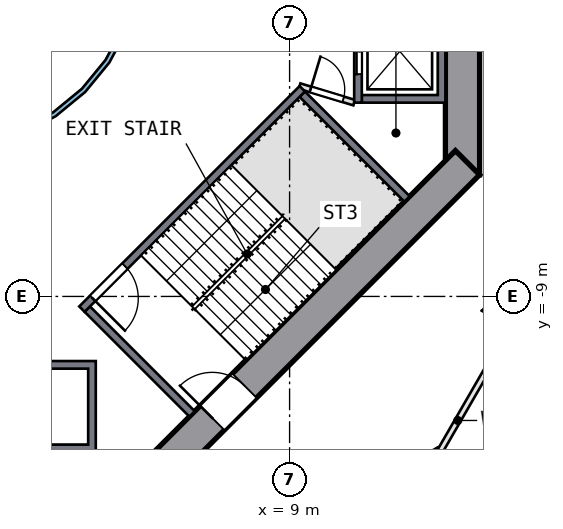
"""IFC4 building model, lengths in metres.
Left out: names, types, materials, properties, quantities, classifications, styles, units other than length and angle.
Written with IfcOpenShell. Run it as: python <this file> out.ifc"""

import sys

from ifc_helpers import new_model, si_unit, direction, frame, frame_2d, origin, place, context, subcontext, project, spatial, polyline, rectangle, outline, extrude, element, fill, save


model = new_model("IFC4")
c1 = context("Model", 3, precision=1e-05, world=origin(), true_north=direction((0.0, 1.0)))
c2 = subcontext(c1, "Body", "Model", "MODEL_VIEW")
j1 = project(units=[si_unit("LENGTHUNIT", "METRE"), si_unit("PLANEANGLEUNIT", "RADIAN")], contexts=[c1])
p1 = place(None, origin())
s1 = spatial("IfcSite", under=j1, at=p1, CompositionType="ELEMENT")
p2 = place(p1, origin())
s2 = spatial("IfcBuilding", under=s1, at=p2, CompositionType="ELEMENT")
p3 = place(p2, frame((0.0, 0.0, 23.5)))
s3 = spatial("IfcBuildingStorey", under=s2, at=p3, CompositionType="ELEMENT", Elevation=23.5)
p4 = place(p3, frame((13.55, -5.799, 0.0), z_axis=(0.0, 0.0, 1.0), x_axis=(0.0, 1.0, 0.0)))
e1 = element("IfcWall", 1, at=p4, inside=s3, PredefinedType="SHEAR", context=c2, shape_type="SweptSolid", body=[
    extrude(rectangle(XDim=11.598, YDim=0.9, at=frame_2d((5.799, 0.0))), origin(), (0.0, 0.0, 1.0), 4.5),
])
p5 = place(p4, frame((4.899, 0.0, 0.0)))
e2 = element("IfcOpeningElement", 2, at=p5, cuts=e1, PredefinedType="OPENING", context=c2, shape_type="SweptSolid", body=[
    extrude(rectangle(XDim=1.8, YDim=2.1, at=frame_2d((0.9, 1.05))), frame((0.0, 0.46, 0.0), z_axis=(0.0, -1.0, 0.0), x_axis=(1.0, 0.0, 0.0)), (0.0, 0.0, 1.0), 0.92),
])
p6 = place(p3, frame((5.481, -13.682, 0.0), z_axis=(0.0, 0.0, 1.0), x_axis=(0.707106781, 0.707106781, 0.0)))
e3 = element("IfcWall", 3, at=p6, inside=s3, PredefinedType="SHEAR", context=c2, shape_type="SweptSolid", body=[
    extrude(rectangle(XDim=11.598, YDim=0.9, at=frame_2d((5.799, 0.0))), origin(), (0.0, 0.0, 1.0), 4.5),
])
p7 = place(p6, frame((2.099, 0.0, 0.0)))
e4 = element("IfcOpeningElement", 4, at=p7, cuts=e3, PredefinedType="OPENING", context=c2, shape_type="SweptSolid", body=[
    extrude(rectangle(XDim=1.2, YDim=2.1, at=frame_2d((0.6, 1.05))), frame((0.0, 0.46, 0.0), z_axis=(0.0, -1.0, 0.0), x_axis=(1.0, 0.0, 0.0)), (0.0, 0.0, 1.0), 0.92),
])
p8 = place(p3, origin())
e5 = element("IfcWall", 5, at=p8, inside=s3, PredefinedType="SOLIDWALL", context=c2, shape_type="SweptSolid", body=[
    extrude(outline(polyline([(13.1, -3.9), (10.9, -3.9), (10.9, -3.7), (12.9, -3.7), (12.9, -1.4), (10.9, -1.4), (10.9, -1.2), (13.1, -1.2), (13.1, -3.9)])), origin(), (0.0, 0.0, 1.0), 4.0),
])
p9 = place(p3, frame((10.8, -1.2, 0.0), z_axis=(0.0, 0.0, 1.0), x_axis=(0.0, -1.0, 0.0)))
e6 = element("IfcWall", 6, at=p9, inside=s3, PredefinedType="SOLIDWALL", context=c2, shape_type="SweptSolid", body=[
    extrude(rectangle(XDim=2.7, YDim=0.2, at=frame_2d((1.35, 0.0))), origin(), (0.0, 0.0, 1.0), 4.0),
])
p10 = place(p9, frame((0.75, 0.0, 0.0)))
e7 = element("IfcOpeningElement", 7, at=p10, cuts=e6, PredefinedType="OPENING", context=c2, shape_type="SweptSolid", body=[
    extrude(rectangle(XDim=1.2, YDim=2.1, at=frame_2d((0.6, 1.05))), frame((0.0, 0.11, 0.0), z_axis=(0.0, -1.0, 0.0), x_axis=(1.0, 0.0, 0.0)), (0.0, 0.0, 1.0), 0.22),
])
p11 = place(p3, origin())
e8 = element("IfcWall", 8, at=p11, inside=s3, PredefinedType="SOLIDWALL", context=c2, shape_type="SweptSolid", body=[
    extrude(outline(polyline([(3.9, -10.7), (3.9, -13.1), (1.2, -13.1), (1.2, -10.7), (3.9, -10.7)]), holes=[polyline([(1.4, -12.9), (3.7, -12.9), (3.7, -10.9), (1.4, -10.9), (1.4, -12.9)])]), origin(), (0.0, 0.0, 1.0), 4.0),
])
p12 = place(p3, frame((9.334, -3.535, 0.0), z_axis=(0.0, 0.0, 1.0), x_axis=(-0.707106781, -0.707106781, 0.0)))
e9 = element("IfcWall", 9, at=p12, inside=s3, PredefinedType="SOLIDWALL", context=c2, shape_type="SweptSolid", body=[
    extrude(rectangle(XDim=8.2, YDim=0.2, at=frame_2d((4.1, 0.0))), origin(), (0.0, 0.0, 1.0), 4.0),
])
p13 = place(p12, frame((6.6, 0.0, 0.0)))
e10 = element("IfcOpeningElement", 10, at=p13, cuts=e9, PredefinedType="OPENING", context=c2, shape_type="SweptSolid", body=[
    extrude(rectangle(XDim=1.2, YDim=2.1, at=frame_2d((0.6, 1.05))), frame((0.0, 0.11, 0.0), z_axis=(0.0, -1.0, 0.0), x_axis=(1.0, 0.0, 0.0)), (0.0, 0.0, 1.0), 0.22),
])
for number, where, z_axis, x_axis in (
    (11, (3.677, -9.334, 0.0), (0.0, 0.0, 1.0), (0.707, -0.707, 0.0)),
    (12, (9.334, -3.677, 0.0), (0.0, 0.0, 1.0), (0.707, -0.707, 0.0)),
):
    element("IfcWall", number, at=place(p3, frame(where, z_axis=z_axis, x_axis=x_axis)), inside=s3, PredefinedType="SOLIDWALL", context=c2, shape_type="SweptSolid", body=[
        extrude(rectangle(XDim=3.9, YDim=0.2, at=frame_2d((1.95, 0.0))), origin(), (0.0, 0.0, 1.0), 4.0),
    ])
p14 = place(p3, frame((9.263, -3.465, 0.0), z_axis=(0.0, 0.0, 1.0), x_axis=(0.957084567, -0.289808785, 0.0)))
e13 = element("IfcWall", 13, at=p14, inside=s3, PredefinedType="PARTITIONING", context=c2, shape_type="SweptSolid", body=[
    extrude(rectangle(XDim=1.501, YDim=0.15, at=frame_2d((0.75, 0.0))), origin(), (0.0, 0.0, 1.0), 4.0),
])
p15 = place(p14, frame((0.301, 0.0, 0.0)))
e14 = element("IfcOpeningElement", 14, at=p15, cuts=e13, PredefinedType="OPENING", context=c2, shape_type="SweptSolid", body=[
    extrude(rectangle(XDim=0.9, YDim=2.1, at=frame_2d((0.45, 1.05))), frame((0.0, 0.085, 0.0), z_axis=(0.0, -1.0, 0.0), x_axis=(1.0, 0.0, 0.0)), (0.0, 0.0, 1.0), 0.17),
])
p16 = place(p3, origin())
e15 = element("IfcWall", 15, at=p16, inside=s3, PredefinedType="SOLIDWALL", context=c2, shape_type="SweptSolid", body=[
    extrude(outline(polyline([(5.021, -0.999), (4.73, -1.959), (4.257, -2.844), (3.62, -3.62), (2.844, -4.257), (1.959, -4.73), (0.999, -5.021), (0.0, -5.12), (-0.999, -5.021), (-1.959, -4.73), (-2.844, -4.257), (-3.62, -3.62), (-4.257, -2.844), (-4.73, -1.959), (-5.021, -0.999), (-5.12, 0.0), (-5.021, 0.999), (-4.73, 1.959), (-4.257, 2.844), (-3.62, 3.62), (-2.844, 4.257), (-1.959, 4.73), (-0.999, 5.021), (0.0, 5.12), (0.999, 5.021), (1.959, 4.73), (2.844, 4.257), (3.62, 3.62), (4.257, 2.844), (4.73, 1.959), (5.021, 0.999), (5.12, 0.0), (5.021, -0.999)]), holes=[polyline([(4.904, 0.976), (4.619, 1.913), (4.157, 2.778), (3.535, 3.535), (2.778, 4.157), (1.913, 4.619), (0.976, 4.904), (0.0, 5.0), (-0.976, 4.904), (-1.913, 4.619), (-2.778, 4.157), (-3.535, 3.535), (-4.157, 2.778), (-4.619, 1.913), (-4.904, 0.976), (-5.0, 0.0), (-4.904, -0.976), (-4.619, -1.913), (-4.157, -2.778), (-3.535, -3.535), (-2.778, -4.157), (-1.913, -4.619), (-0.976, -4.904), (0.0, -5.0), (0.976, -4.904), (1.913, -4.619), (2.778, -4.157), (3.535, -3.535), (4.157, -2.778), (4.619, -1.913), (4.904, -0.976), (5.0, 0.0), (4.904, 0.976)])]), origin(), (0.0, 0.0, 1.0), 4.0),
])
p17 = place(p3, frame((4.823, -17.721, 0.0), z_axis=(0.0, 0.0, 1.0), x_axis=(0.866037142, 0.499979668, 0.0)))
e16 = element("IfcWall", 16, at=p17, inside=s3, PredefinedType="PARTITIONING", context=c2, shape_type="SweptSolid", body=[
    extrude(rectangle(XDim=9.367, YDim=0.15, at=frame_2d((4.683, 0.0))), origin(), (0.0, 0.0, 1.0), 4.0),
])
p18 = place(p17, frame((5.817, 0.0, 0.0)))
e17 = element("IfcOpeningElement", 17, at=p18, cuts=e16, PredefinedType="OPENING", context=c2, shape_type="SweptSolid", body=[
    extrude(rectangle(XDim=1.8, YDim=2.1, at=frame_2d((0.9, 1.05))), frame((0.0, 0.085, 0.0), z_axis=(0.0, -1.0, 0.0), x_axis=(1.0, 0.0, 0.0)), (0.0, 0.0, 1.0), 0.17),
])
p19 = place(p3, frame((12.117, -14.53, 0.0), z_axis=(0.0, 0.0, 1.0), x_axis=(0.500001509, 0.866024532, 0.0)))
e18 = element("IfcWall", 18, at=p19, inside=s3, PredefinedType="PARTITIONING", context=c2, shape_type="SweptSolid", body=[
    extrude(rectangle(XDim=11.183, YDim=0.15, at=frame_2d((5.592, 0.0))), origin(), (0.0, 0.0, 1.0), 4.0),
])
p20 = place(p19, frame((5.433, 0.0, 0.0)))
e19 = element("IfcOpeningElement", 19, at=p20, cuts=e18, PredefinedType="OPENING", context=c2, shape_type="SweptSolid", body=[
    extrude(rectangle(XDim=1.8, YDim=2.1, at=frame_2d((0.9, 1.05))), frame((0.0, 0.085, 0.0), z_axis=(0.0, -1.0, 0.0), x_axis=(1.0, 0.0, 0.0)), (0.0, 0.0, 1.0), 0.17),
])
p21 = place(p10, origin())
e20 = element("IfcDoor", 20, at=p21, inside=s3, OperationType="DOUBLE_DOOR_SLIDING", PredefinedType="DOOR", context=c2, shape_type="SweptSolid", body=[
    extrude(rectangle(XDim=1.2, YDim=2.1, at=frame_2d((0.6, 1.05))), frame((0.0, 0.025, 0.0), z_axis=(0.0, -1.0, 0.0), x_axis=(1.0, 0.0, 0.0)), (0.0, 0.0, 1.0), 0.05),
])
fill(e7, e20)
p22 = place(p13, origin())
e21 = element("IfcDoor", 21, at=p22, inside=s3, OperationType="SINGLE_SWING_RIGHT", PredefinedType="DOOR", context=c2, shape_type="SweptSolid", body=[
    extrude(rectangle(XDim=1.2, YDim=2.1, at=frame_2d((0.6, 1.05))), frame((0.0, 0.025, 0.0), z_axis=(0.0, -1.0, 0.0), x_axis=(1.0, 0.0, 0.0)), (0.0, 0.0, 1.0), 0.05),
])
fill(e10, e21)
p23 = place(p7, origin())
e22 = element("IfcDoor", 22, at=p23, inside=s3, OperationType="SINGLE_SWING_LEFT", PredefinedType="DOOR", context=c2, shape_type="SweptSolid", body=[
    extrude(rectangle(XDim=1.2, YDim=2.1, at=frame_2d((0.6, 1.05))), frame((0.0, 0.025, 0.0), z_axis=(0.0, -1.0, 0.0), x_axis=(1.0, 0.0, 0.0)), (0.0, 0.0, 1.0), 0.05),
])
fill(e4, e22)
p24 = place(p15, origin())
e23 = element("IfcDoor", 23, at=p24, inside=s3, OperationType="SINGLE_SWING_LEFT", PredefinedType="DOOR", context=c2, shape_type="SweptSolid", body=[
    extrude(rectangle(XDim=0.9, YDim=2.1, at=frame_2d((0.45, 1.05))), frame((0.0, 0.025, 0.0), z_axis=(0.0, -1.0, 0.0), x_axis=(1.0, 0.0, 0.0)), (0.0, 0.0, 1.0), 0.05),
])
fill(e14, e23)
save(model, sys.argv[1])
